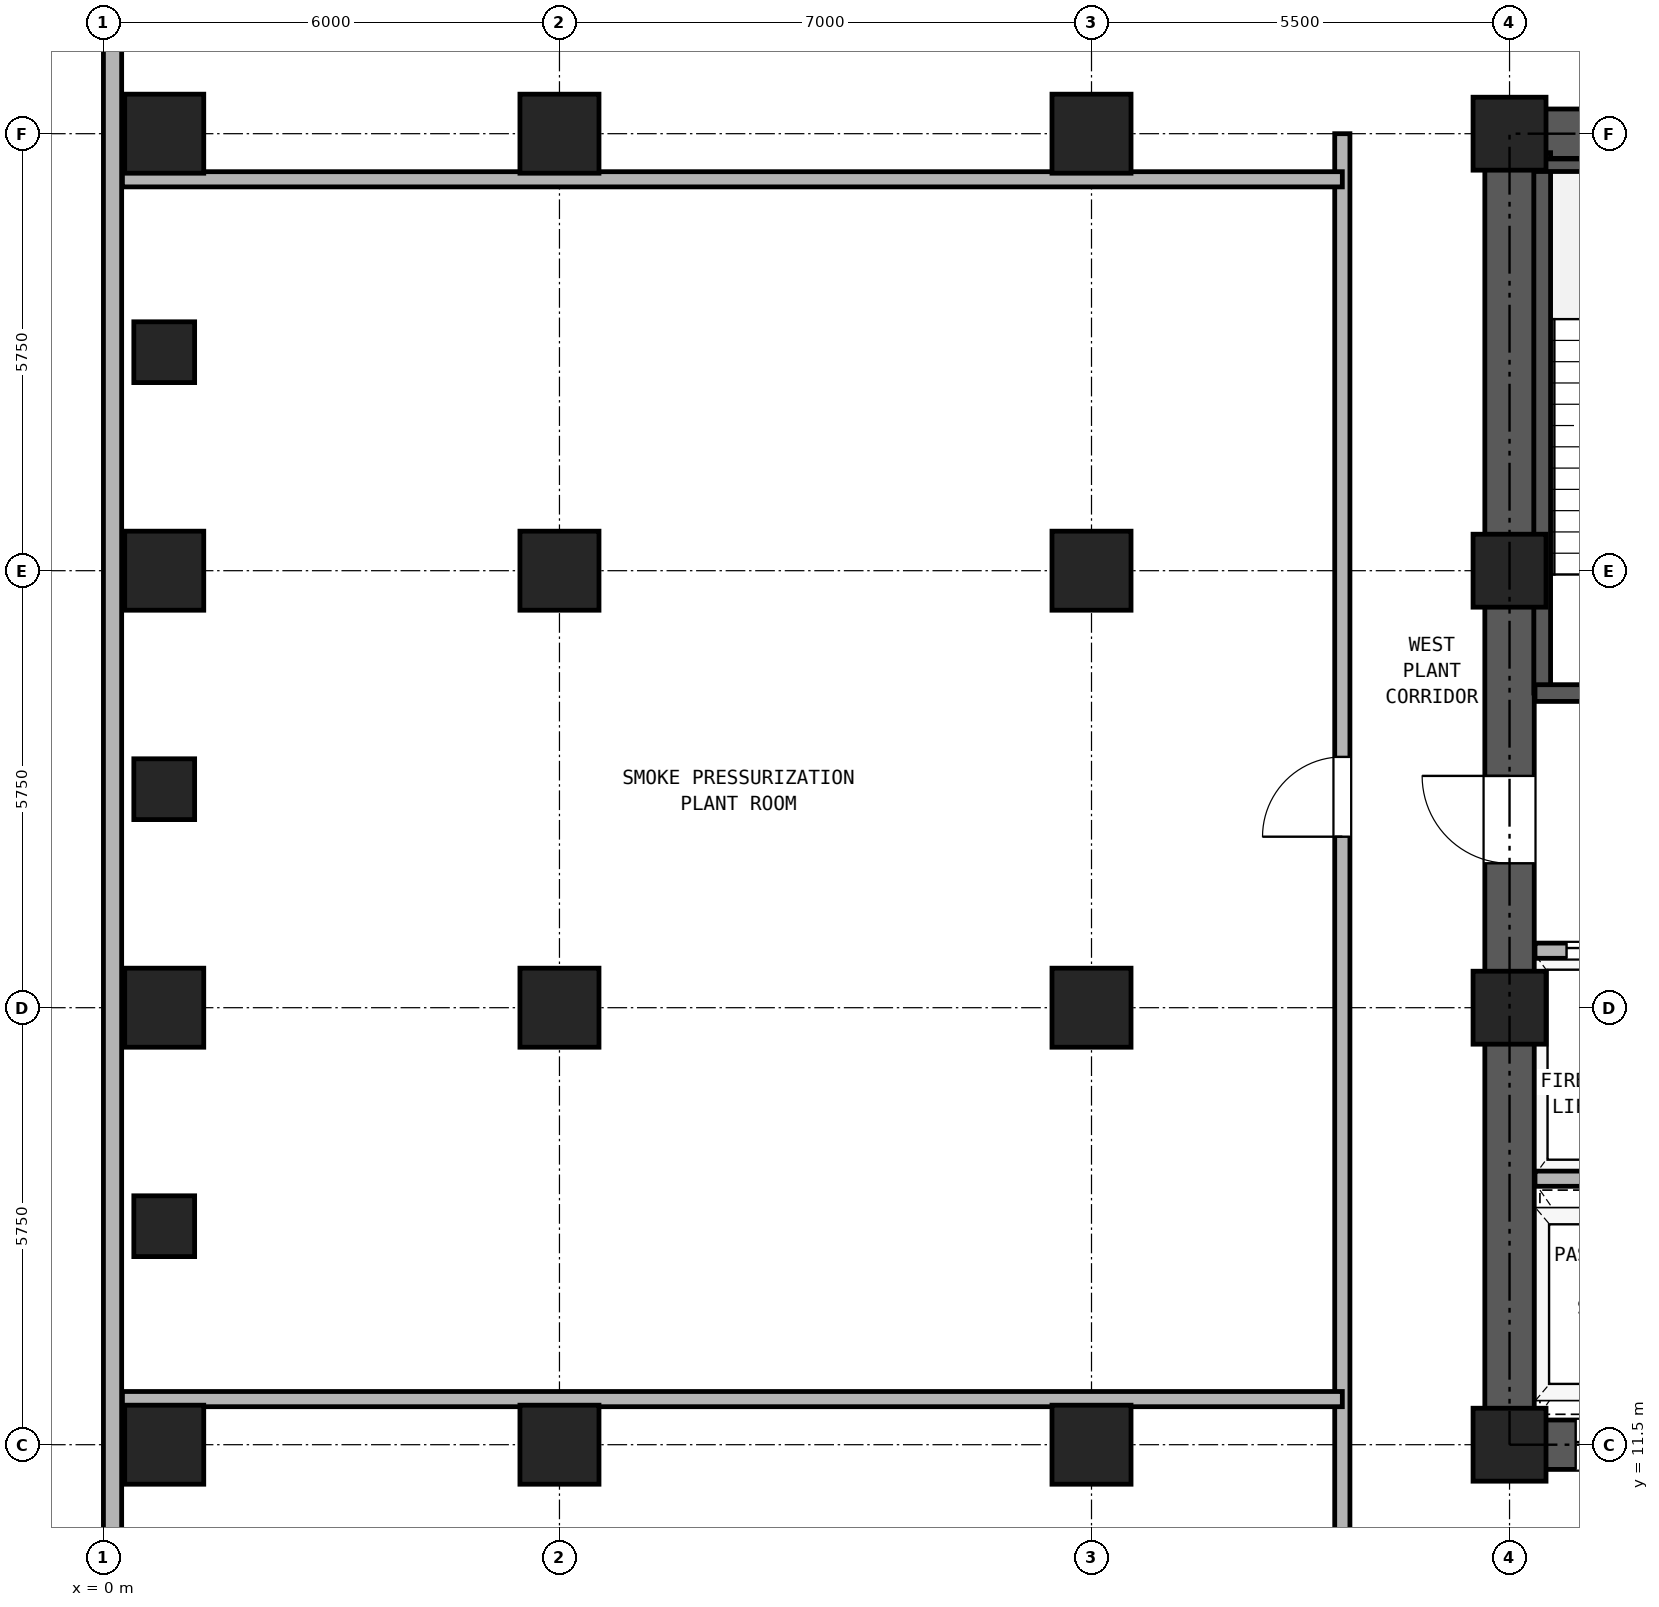
"""IFC4 building model, lengths in metres.
Left out: names, types, materials, properties, quantities, classifications, styles, units other than length and angle.
Written with IfcOpenShell. Run it as: python <this file> out.ifc"""

import sys

from ifc_helpers import new_model, si_unit, direction, frame, frame_2d, origin, origin_2d, place, context, subcontext, project, spatial, rectangle, hollow_rectangle, extrude, source, transform, mapped, element, fill, save


model = new_model("IFC4")
c1 = context("Model", 3, precision=1e-05, world=origin(), true_north=direction((0.0, 1.0)))
c2 = subcontext(c1, "Body", "Model", "MODEL_VIEW")
j1 = project(units=[si_unit("LENGTHUNIT", "METRE"), si_unit("PLANEANGLEUNIT", "RADIAN")], contexts=[c1])
p1 = place(None, origin())
s1 = spatial("IfcSite", under=j1, at=p1, CompositionType="ELEMENT")
p2 = place(p1, origin())
s2 = spatial("IfcBuilding", under=s1, at=p2, CompositionType="ELEMENT")
p3 = place(p2, frame((0.0, 0.0, 76.5)))
s3 = spatial("IfcBuildingStorey", under=s2, at=p3, CompositionType="ELEMENT", Elevation=76.5)
m1 = source(origin(), c2, "Body", "SweptSolid", [
    extrude(hollow_rectangle(XDim=1.04, YDim=1.04, WallThickness=0.065, at=origin_2d()), origin(), (0.0, 0.0, 1.0), 4.22),
])
for number, where, z_axis, x_axis in (
    (1, (0.8, 11.5, 0.0), (0.0, 0.0, 1.0), (1.0, 0.0, 0.0)),
    (2, (0.8, 17.25, 0.0), (0.0, 0.0, 1.0), (1.0, 0.0, 0.0)),
    (3, (0.8, 23.0, 0.0), (0.0, 0.0, 1.0), (1.0, 0.0, 0.0)),
    (4, (0.8, 28.75, 0.0), (0.0, 0.0, 1.0), (1.0, 0.0, 0.0)),
    (5, (6.0, 11.5, 0.0), (0.0, 0.0, 1.0), (1.0, 0.0, 0.0)),
    (6, (6.0, 17.25, 0.0), (0.0, 0.0, 1.0), (1.0, 0.0, 0.0)),
    (7, (6.0, 23.0, 0.0), (0.0, 0.0, 1.0), (1.0, 0.0, 0.0)),
    (8, (6.0, 28.75, 0.0), (0.0, 0.0, 1.0), (1.0, 0.0, 0.0)),
    (9, (13.0, 11.5, 0.0), (0.0, 0.0, 1.0), (1.0, 0.0, 0.0)),
    (10, (13.0, 17.25, 0.0), (0.0, 0.0, 1.0), (1.0, 0.0, 0.0)),
    (11, (13.0, 23.0, 0.0), (0.0, 0.0, 1.0), (1.0, 0.0, 0.0)),
    (12, (13.0, 28.75, 0.0), (0.0, 0.0, 1.0), (1.0, 0.0, 0.0)),
):
    element("IfcColumn", number, at=place(p3, frame(where, z_axis=z_axis, x_axis=x_axis)), inside=s3, PredefinedType="COLUMN", context=c2, shape_type="MappedRepresentation", body=[
        mapped(m1, transform((0.0, 0.0, 0.0), x_axis=(1.0, 0.0, 0.0), y_axis=(0.0, 1.0, 0.0), z_axis=(0.0, 0.0, 1.0), scale=1.0)),
    ])
m2 = source(origin(), c2, "Body", "SweptSolid", [
    extrude(hollow_rectangle(XDim=0.96, YDim=0.96, WallThickness=0.06, at=origin_2d()), origin(), (0.0, 0.0, 1.0), 4.22),
])
for number, where, z_axis, x_axis in (
    (13, (18.5, 11.5, 0.0), (0.0, 0.0, 1.0), (1.0, 0.0, 0.0)),
    (14, (18.5, 17.25, 0.0), (0.0, 0.0, 1.0), (1.0, 0.0, 0.0)),
    (15, (18.5, 23.0, 0.0), (0.0, 0.0, 1.0), (1.0, 0.0, 0.0)),
    (16, (18.5, 28.75, 0.0), (0.0, 0.0, 1.0), (1.0, 0.0, 0.0)),
):
    element("IfcColumn", number, at=place(p3, frame(where, z_axis=z_axis, x_axis=x_axis)), inside=s3, PredefinedType="COLUMN", context=c2, shape_type="MappedRepresentation", body=[
        mapped(m2, transform((0.0, 0.0, 0.0), x_axis=(1.0, 0.0, 0.0), y_axis=(0.0, 1.0, 0.0), z_axis=(0.0, 0.0, 1.0), scale=1.0)),
    ])
m3 = source(origin(), c2, "Body", "SweptSolid", [
    extrude(hollow_rectangle(XDim=0.8, YDim=0.8, WallThickness=0.045, at=origin_2d()), origin(), (0.0, 0.0, 1.0), 4.22),
])
for number, where, z_axis, x_axis in (
    (17, (0.8, 14.375, 0.0), (0.0, 0.0, 1.0), (1.0, 0.0, 0.0)),
    (18, (0.8, 20.125, 0.0), (0.0, 0.0, 1.0), (1.0, 0.0, 0.0)),
    (19, (0.8, 25.875, 0.0), (0.0, 0.0, 1.0), (1.0, 0.0, 0.0)),
):
    element("IfcColumn", number, at=place(p3, frame(where, z_axis=z_axis, x_axis=x_axis)), inside=s3, PredefinedType="COLUMN", context=c2, shape_type="MappedRepresentation", body=[
        mapped(m3, transform((0.0, 0.0, 0.0), x_axis=(1.0, 0.0, 0.0), y_axis=(0.0, 1.0, 0.0), z_axis=(0.0, 0.0, 1.0), scale=1.0)),
    ])
p4 = place(p3, frame((0.12, 36.5, 0.0), z_axis=(0.0, 0.0, 1.0), x_axis=(0.0, -1.0, 0.0)))
e20 = element("IfcWall", 20, at=p4, inside=s3, PredefinedType="SOLIDWALL", context=c2, shape_type="SweptSolid", body=[
    extrude(rectangle(XDim=32.5, YDim=0.24, at=frame_2d((16.25, 0.0))), origin(), (0.0, 0.0, 1.0), 4.22),
])
p5 = place(p3, frame((18.175, 11.5, 0.0), z_axis=(0.0, 0.0, 1.0), x_axis=(1.0, 0.0, 0.0)))
e21 = element("IfcWall", 21, at=p5, inside=s3, PredefinedType="SHEAR", context=c2, shape_type="SweptSolid", body=[
    extrude(rectangle(XDim=10.65, YDim=0.65, at=frame_2d((5.325, 0.0))), origin(), (0.0, 0.0, 1.0), 4.22),
])
p6 = place(p5, frame((1.195, 0.0, 0.0)))
e22 = element("IfcOpeningElement", 22, at=p6, cuts=e21, PredefinedType="OPENING", context=c2, shape_type="SweptSolid", body=[
    extrude(rectangle(XDim=1.1, YDim=2.25, at=frame_2d((0.55, 1.125))), frame((0.0, 0.335, 0.0), z_axis=(0.0, -1.0, 0.0), x_axis=(1.0, 0.0, 0.0)), (0.0, 0.0, 1.0), 0.67),
])
p7 = place(p5, frame((3.495, 0.0, 0.0)))
e23 = element("IfcOpeningElement", 23, at=p7, cuts=e21, PredefinedType="OPENING", context=c2, shape_type="SweptSolid", body=[
    extrude(rectangle(XDim=1.1, YDim=2.25, at=frame_2d((0.55, 1.125))), frame((0.0, 0.335, 0.0), z_axis=(0.0, -1.0, 0.0), x_axis=(1.0, 0.0, 0.0)), (0.0, 0.0, 1.0), 0.67),
])
p8 = place(p5, frame((5.925, 0.0, 0.0)))
e24 = element("IfcOpeningElement", 24, at=p8, cuts=e21, PredefinedType="OPENING", context=c2, shape_type="SweptSolid", body=[
    extrude(rectangle(XDim=1.1, YDim=2.25, at=frame_2d((0.55, 1.125))), frame((0.0, 0.335, 0.0), z_axis=(0.0, -1.0, 0.0), x_axis=(1.0, 0.0, 0.0)), (0.0, 0.0, 1.0), 0.67),
])
p9 = place(p5, frame((8.325, 0.0, 0.0)))
e25 = element("IfcOpeningElement", 25, at=p9, cuts=e21, PredefinedType="OPENING", context=c2, shape_type="SweptSolid", body=[
    extrude(rectangle(XDim=1.1, YDim=2.25, at=frame_2d((0.55, 1.125))), frame((0.0, 0.335, 0.0), z_axis=(0.0, -1.0, 0.0), x_axis=(1.0, 0.0, 0.0)), (0.0, 0.0, 1.0), 0.67),
])
p10 = place(p3, frame((18.175, 28.75, 0.0), z_axis=(0.0, 0.0, 1.0), x_axis=(1.0, 0.0, 0.0)))
e26 = element("IfcWall", 26, at=p10, inside=s3, PredefinedType="SHEAR", context=c2, shape_type="SweptSolid", body=[
    extrude(rectangle(XDim=10.65, YDim=0.65, at=frame_2d((5.325, 0.0))), origin(), (0.0, 0.0, 1.0), 4.22),
])
p11 = place(p10, frame((4.205, 0.0, 0.0)))
e27 = element("IfcOpeningElement", 27, at=p11, cuts=e26, PredefinedType="OPENING", context=c2, shape_type="SweptSolid", body=[
    extrude(rectangle(XDim=0.9, YDim=2.05, at=frame_2d((0.45, 1.025))), frame((0.0, 0.335, 0.0), z_axis=(0.0, -1.0, 0.0), x_axis=(1.0, 0.0, 0.0)), (0.0, 0.0, 1.0), 0.67),
])
p12 = place(p10, frame((5.745, 0.0, 0.0)))
e28 = element("IfcOpeningElement", 28, at=p12, cuts=e26, PredefinedType="OPENING", context=c2, shape_type="SweptSolid", body=[
    extrude(rectangle(XDim=0.9, YDim=2.05, at=frame_2d((0.45, 1.025))), frame((0.0, 0.335, 0.0), z_axis=(0.0, -1.0, 0.0), x_axis=(1.0, 0.0, 0.0)), (0.0, 0.0, 1.0), 0.67),
])
p13 = place(p3, frame((18.5, 11.825, 0.0), z_axis=(0.0, 0.0, 1.0), x_axis=(0.0, 1.0, 0.0)))
e29 = element("IfcWall", 29, at=p13, inside=s3, PredefinedType="SHEAR", context=c2, shape_type="SweptSolid", body=[
    extrude(rectangle(XDim=16.6, YDim=0.65, at=frame_2d((8.3, 0.0))), origin(), (0.0, 0.0, 1.0), 4.22),
])
p14 = place(p13, frame((7.325, 0.0, 0.0)))
e30 = element("IfcOpeningElement", 30, at=p14, cuts=e29, PredefinedType="OPENING", context=c2, shape_type="SweptSolid", body=[
    extrude(rectangle(XDim=1.15, YDim=2.2, at=frame_2d((0.575, 1.1))), frame((0.0, 0.335, 0.0), z_axis=(0.0, -1.0, 0.0), x_axis=(1.0, 0.0, 0.0)), (0.0, 0.0, 1.0), 0.67),
])
p15 = place(p3, frame((18.93, 21.39, 0.0), z_axis=(0.0, 0.0, 1.0), x_axis=(0.0, 1.0, 0.0)))
e31 = element("IfcWall", 31, at=p15, inside=s3, PredefinedType="SOLIDWALL", context=c2, shape_type="SweptSolid", body=[
    extrude(rectangle(XDim=7.11, YDim=0.22, at=frame_2d((3.555, 0.0))), origin(), (0.0, 0.0, 1.0), 4.22),
])
p16 = place(p3, frame((18.835, 28.335, 0.0), z_axis=(0.0, 0.0, 1.0), x_axis=(1.0, 0.0, 0.0)))
e32 = element("IfcWall", 32, at=p16, inside=s3, PredefinedType="PARTITIONING", context=c2, shape_type="SweptSolid", body=[
    extrude(rectangle(XDim=3.275, YDim=0.165, at=frame_2d((1.638, 0.0))), origin(), (0.0, 0.0, 1.0), 4.22),
])
p17 = place(p3, frame((18.835, 21.39, 0.0), z_axis=(0.0, 0.0, 1.0), x_axis=(1.0, 0.0, 0.0)))
e33 = element("IfcWall", 33, at=p17, inside=s3, PredefinedType="SOLIDWALL", context=c2, shape_type="SweptSolid", body=[
    extrude(rectangle(XDim=6.295, YDim=0.22, at=frame_2d((3.147, 0.0))), origin(), (0.0, 0.0, 1.0), 4.22),
])
p18 = place(p17, frame((1.015, 0.0, 0.0)))
e34 = element("IfcOpeningElement", 34, at=p18, cuts=e33, PredefinedType="OPENING", context=c2, shape_type="SweptSolid", body=[
    extrude(rectangle(XDim=1.15, YDim=2.2, at=frame_2d((0.575, 1.1))), frame((0.0, 0.12, 0.0), z_axis=(0.0, -1.0, 0.0), x_axis=(1.0, 0.0, 0.0)), (0.0, 0.0, 1.0), 0.24),
])
p19 = place(p17, frame((4.745, 0.0, 0.0)))
e35 = element("IfcOpeningElement", 35, at=p19, cuts=e33, PredefinedType="OPENING", context=c2, shape_type="SweptSolid", body=[
    extrude(rectangle(XDim=1.1, YDim=2.25, at=frame_2d((0.55, 1.125))), frame((0.0, 0.12, 0.0), z_axis=(0.0, -1.0, 0.0), x_axis=(1.0, 0.0, 0.0)), (0.0, 0.0, 1.0), 0.24),
])
p20 = place(p3, frame((18.835, 18.0, 0.0), z_axis=(0.0, 0.0, 1.0), x_axis=(1.0, 0.0, 0.0)))
e36 = element("IfcWall", 36, at=p20, inside=s3, PredefinedType="PARTITIONING", context=c2, shape_type="SweptSolid", body=[
    extrude(rectangle(XDim=9.33, YDim=0.2, at=frame_2d((4.665, 0.0))), origin(), (0.0, 0.0, 1.0), 4.22),
])
p21 = place(p20, frame((0.415, 0.0, 0.0)))
e37 = element("IfcOpeningElement", 37, at=p21, cuts=e36, PredefinedType="OPENING", context=c2, shape_type="SweptSolid", body=[
    extrude(rectangle(XDim=1.3, YDim=2.3, at=frame_2d((0.65, 1.15))), frame((0.0, 0.11, 0.0), z_axis=(0.0, -1.0, 0.0), x_axis=(1.0, 0.0, 0.0)), (0.0, 0.0, 1.0), 0.22),
])
p22 = place(p20, frame((2.515, 0.0, 0.0)))
e38 = element("IfcOpeningElement", 38, at=p22, cuts=e36, PredefinedType="OPENING", context=c2, shape_type="SweptSolid", body=[
    extrude(rectangle(XDim=1.3, YDim=2.3, at=frame_2d((0.65, 1.15))), frame((0.0, 0.11, 0.0), z_axis=(0.0, -1.0, 0.0), x_axis=(1.0, 0.0, 0.0)), (0.0, 0.0, 1.0), 0.22),
])
p23 = place(p20, frame((7.015, 0.0, 0.0)))
e39 = element("IfcOpeningElement", 39, at=p23, cuts=e36, PredefinedType="OPENING", context=c2, shape_type="SweptSolid", body=[
    extrude(rectangle(XDim=1.0, YDim=2.15, at=frame_2d((0.5, 1.075))), frame((0.0, 0.11, 0.0), z_axis=(0.0, -1.0, 0.0), x_axis=(1.0, 0.0, 0.0)), (0.0, 0.0, 1.0), 0.22),
])
p24 = place(p3, frame((18.835, 15.0, 0.0), z_axis=(0.0, 0.0, 1.0), x_axis=(1.0, 0.0, 0.0)))
e40 = element("IfcWall", 40, at=p24, inside=s3, PredefinedType="PARTITIONING", context=c2, shape_type="SweptSolid", body=[
    extrude(rectangle(XDim=9.33, YDim=0.2, at=frame_2d((4.665, 0.0))), origin(), (0.0, 0.0, 1.0), 4.22),
])
p25 = place(p3, frame((16.3, 8.9, 0.0), z_axis=(0.0, 0.0, 1.0), x_axis=(0.0, 1.0, 0.0)))
e41 = element("IfcWall", 41, at=p25, inside=s3, PredefinedType="PARTITIONING", context=c2, shape_type="SweptSolid", body=[
    extrude(rectangle(XDim=19.85, YDim=0.2, at=frame_2d((9.925, 0.0))), origin(), (0.0, 0.0, 1.0), 4.22),
])
p26 = place(p25, frame((10.6, 0.0, 0.0)))
e42 = element("IfcOpeningElement", 42, at=p26, cuts=e41, PredefinedType="OPENING", context=c2, shape_type="SweptSolid", body=[
    extrude(rectangle(XDim=1.05, YDim=2.15, at=frame_2d((0.525, 1.075))), frame((0.0, 0.11, 0.0), z_axis=(0.0, -1.0, 0.0), x_axis=(1.0, 0.0, 0.0)), (0.0, 0.0, 1.0), 0.22),
])
for number, where, z_axis, x_axis in (
    (43, (0.25, 12.1, 0.0), (0.0, 0.0, 1.0), (1.0, 0.0, 0.0)),
    (44, (0.25, 28.15, 0.0), (0.0, 0.0, 1.0), (1.0, 0.0, 0.0)),
):
    element("IfcWall", number, at=place(p3, frame(where, z_axis=z_axis, x_axis=x_axis)), inside=s3, PredefinedType="PARTITIONING", context=c2, shape_type="SweptSolid", body=[
        extrude(rectangle(XDim=16.05, YDim=0.2, at=frame_2d((8.025, 0.0))), origin(), (0.0, 0.0, 1.0), 4.22),
    ])
p27 = place(p21, origin())
e45 = element("IfcDoor", 45, at=p27, inside=s3, OperationType="DOUBLE_DOOR_SLIDING", PredefinedType="DOOR", context=c2, shape_type="SweptSolid", body=[
    extrude(rectangle(XDim=1.3, YDim=2.3, at=frame_2d((0.65, 1.15))), frame((0.0, 0.025, 0.0), z_axis=(0.0, -1.0, 0.0), x_axis=(1.0, 0.0, 0.0)), (0.0, 0.0, 1.0), 0.05),
])
fill(e37, e45)
p28 = place(p14, frame((1.15, 0.0, 0.0), z_axis=(0.0, 0.0, 1.0), x_axis=(-1.0, 0.0, 0.0)))
e46 = element("IfcDoor", 46, at=p28, inside=s3, OperationType="SINGLE_SWING_RIGHT", PredefinedType="DOOR", context=c2, shape_type="SweptSolid", body=[
    extrude(rectangle(XDim=1.15, YDim=2.2, at=frame_2d((0.575, 1.1))), frame((0.0, 0.025, 0.0), z_axis=(0.0, -1.0, 0.0), x_axis=(1.0, 0.0, 0.0)), (0.0, 0.0, 1.0), 0.05),
])
fill(e30, e46)
p29 = place(p6, frame((1.1, 0.0, 0.0), z_axis=(0.0, 0.0, 1.0), x_axis=(-1.0, 0.0, 0.0)))
e47 = element("IfcDoor", 47, at=p29, inside=s3, OperationType="DOUBLE_DOOR_SLIDING", PredefinedType="DOOR", context=c2, shape_type="SweptSolid", body=[
    extrude(rectangle(XDim=1.1, YDim=2.25, at=frame_2d((0.55, 1.125))), frame((0.0, 0.025, 0.0), z_axis=(0.0, -1.0, 0.0), x_axis=(1.0, 0.0, 0.0)), (0.0, 0.0, 1.0), 0.05),
])
fill(e22, e47)
p30 = place(p26, frame((1.05, 0.0, 0.0), z_axis=(0.0, 0.0, 1.0), x_axis=(-1.0, 0.0, 0.0)))
e48 = element("IfcDoor", 48, at=p30, inside=s3, OperationType="SINGLE_SWING_LEFT", PredefinedType="DOOR", context=c2, shape_type="SweptSolid", body=[
    extrude(rectangle(XDim=1.05, YDim=2.15, at=frame_2d((0.525, 1.075))), frame((0.0, 0.025, 0.0), z_axis=(0.0, -1.0, 0.0), x_axis=(1.0, 0.0, 0.0)), (0.0, 0.0, 1.0), 0.05),
])
fill(e42, e48)
save(model, sys.argv[1])
